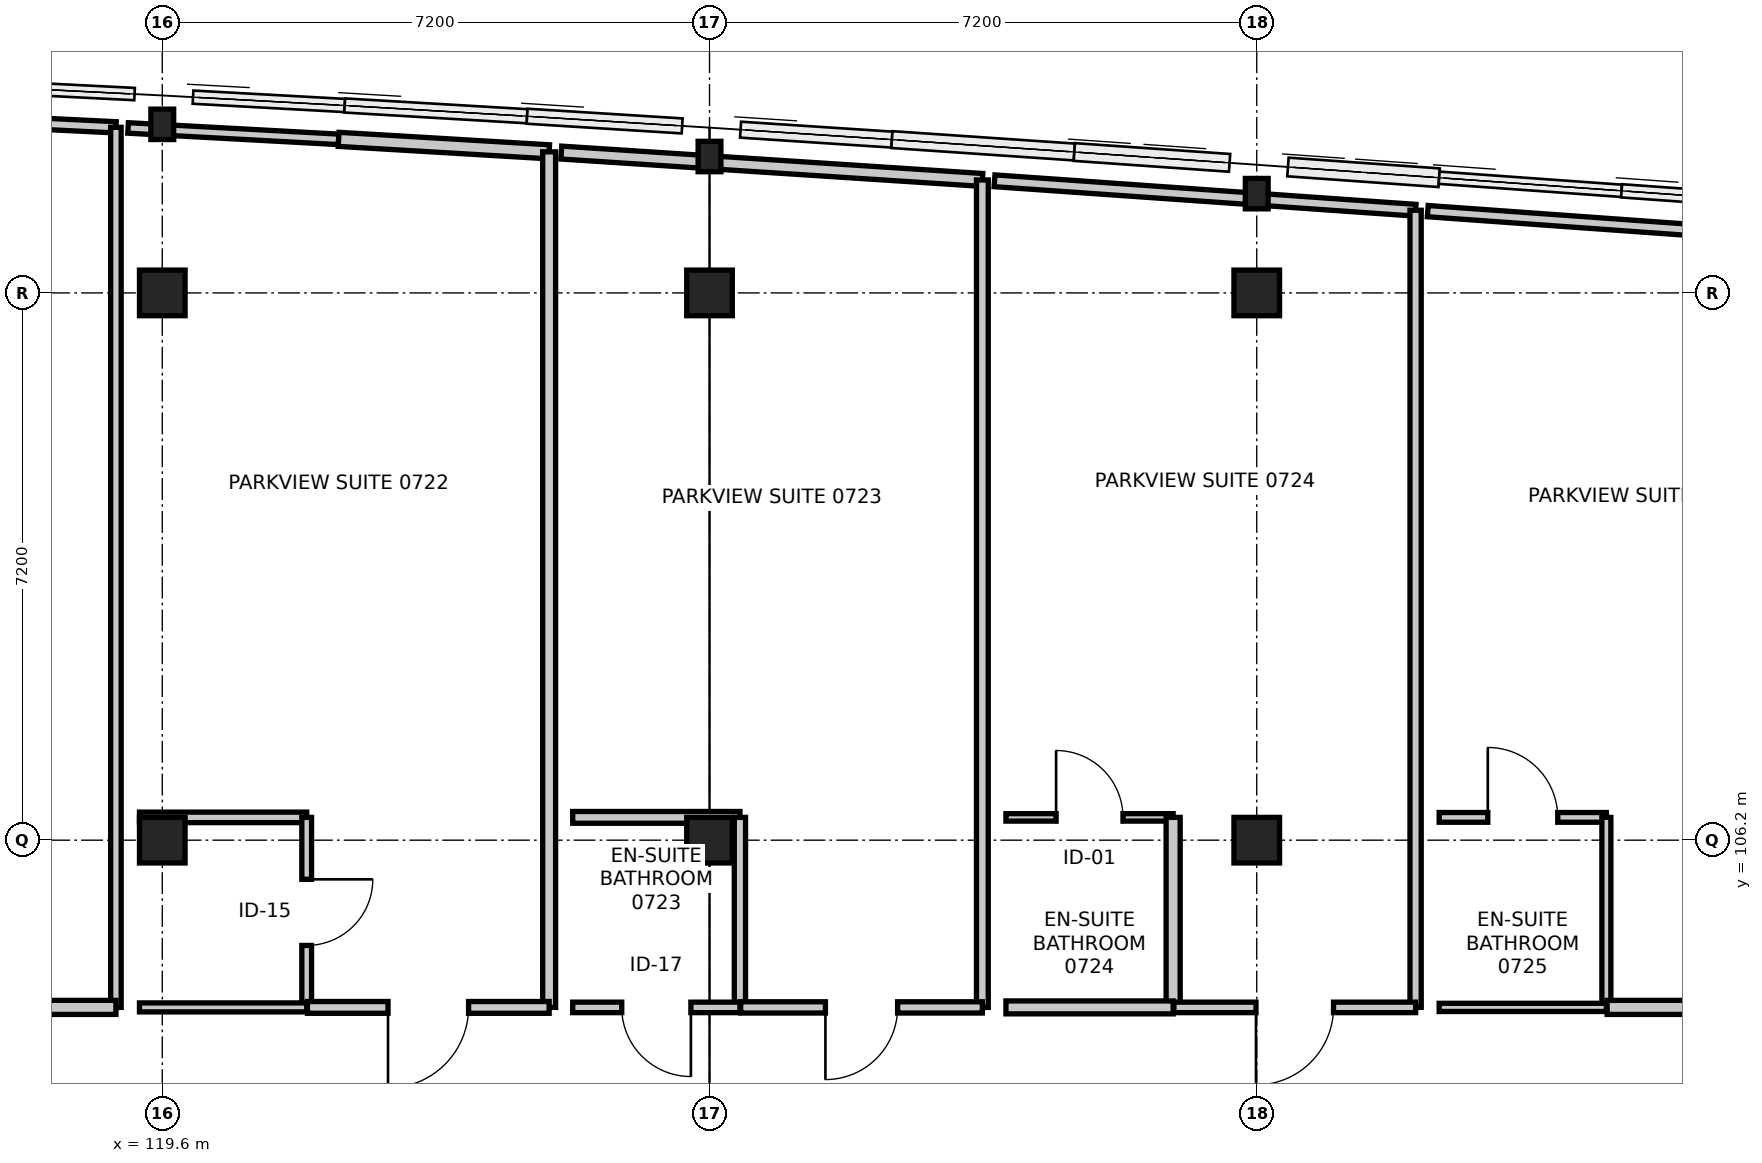
"""IFC4 building model, lengths in metres.
Left out: names, types, materials, properties, quantities, classifications, styles, units other than length and angle.
Written with IfcOpenShell. Run it as: python <this file> out.ifc"""

import sys

from ifc_helpers import new_model, si_unit, direction, frame, frame_2d, origin, origin_2d, place, context, subcontext, project, spatial, rectangle, i_section, extrude, element, fill, save


model = new_model("IFC4")
c1 = context("Model", 3, precision=1e-05, world=origin(), true_north=direction((0.0, 1.0)))
c2 = subcontext(c1, "Body", "Model", "MODEL_VIEW")
j1 = project(units=[si_unit("LENGTHUNIT", "METRE"), si_unit("PLANEANGLEUNIT", "RADIAN")], contexts=[c1])
p1 = place(None, origin())
s1 = spatial("IfcSite", under=j1, at=p1, CompositionType="ELEMENT")
p2 = place(p1, origin())
s2 = spatial("IfcBuilding", under=s1, at=p2, CompositionType="ELEMENT")
p3 = place(p2, frame((0.0, 0.0, 30.0)))
s3 = spatial("IfcBuildingStorey", under=s2, at=p3, CompositionType="ELEMENT", Elevation=30.0)
for number, where, z_axis, x_axis in (
    (1, (119.6, 106.2, 0.0), (0.0, 0.0, 1.0), (1.0, 0.0, 0.0)),
    (2, (119.6, 113.4, 0.0), (0.0, 0.0, 1.0), (1.0, 0.0, 0.0)),
):
    element("IfcColumn", number, at=place(p3, frame(where, z_axis=z_axis, x_axis=x_axis)), inside=s3, PredefinedType="COLUMN", context=c2, shape_type="SweptSolid", body=[
        extrude(rectangle(XDim=0.6, YDim=0.6, at=origin_2d()), origin(), (0.0, 0.0, 1.0), 3.6),
    ])
p4 = place(p3, frame((119.6, 115.618, 0.0), z_axis=(0.0, 0.0, 1.0), x_axis=(1.0, 0.0, 0.0)))
e3 = element("IfcColumn", 3, at=p4, inside=s3, PredefinedType="COLUMN", context=c2, shape_type="SweptSolid", body=[
    extrude(i_section(OverallWidth=0.3, OverallDepth=0.4, WebThickness=0.013, FlangeThickness=0.024, FilletRadius=0.027, at=origin_2d()), origin(), (0.0, 0.0, 1.0), 3.6),
])
for number, where, z_axis, x_axis in (
    (4, (126.8, 106.2, 0.0), (0.0, 0.0, 1.0), (1.0, 0.0, 0.0)),
    (5, (126.8, 113.4, 0.0), (0.0, 0.0, 1.0), (1.0, 0.0, 0.0)),
):
    element("IfcColumn", number, at=place(p3, frame(where, z_axis=z_axis, x_axis=x_axis)), inside=s3, PredefinedType="COLUMN", context=c2, shape_type="SweptSolid", body=[
        extrude(rectangle(XDim=0.6, YDim=0.6, at=origin_2d()), origin(), (0.0, 0.0, 1.0), 3.6),
    ])
p5 = place(p3, frame((126.8, 115.194, 0.0), z_axis=(0.0, 0.0, 1.0), x_axis=(1.0, 0.0, 0.0)))
e6 = element("IfcColumn", 6, at=p5, inside=s3, PredefinedType="COLUMN", context=c2, shape_type="SweptSolid", body=[
    extrude(i_section(OverallWidth=0.3, OverallDepth=0.4, WebThickness=0.013, FlangeThickness=0.024, FilletRadius=0.027, at=origin_2d()), origin(), (0.0, 0.0, 1.0), 3.6),
])
for number, where, z_axis, x_axis in (
    (7, (134.0, 106.2, 0.0), (0.0, 0.0, 1.0), (1.0, 0.0, 0.0)),
    (8, (134.0, 113.4, 0.0), (0.0, 0.0, 1.0), (1.0, 0.0, 0.0)),
):
    element("IfcColumn", number, at=place(p3, frame(where, z_axis=z_axis, x_axis=x_axis)), inside=s3, PredefinedType="COLUMN", context=c2, shape_type="SweptSolid", body=[
        extrude(rectangle(XDim=0.6, YDim=0.6, at=origin_2d()), origin(), (0.0, 0.0, 1.0), 3.6),
    ])
p6 = place(p3, frame((134.0, 114.706, 0.0), z_axis=(0.0, 0.0, 1.0), x_axis=(1.0, 0.0, 0.0)))
e9 = element("IfcColumn", 9, at=p6, inside=s3, PredefinedType="COLUMN", context=c2, shape_type="SweptSolid", body=[
    extrude(i_section(OverallWidth=0.3, OverallDepth=0.4, WebThickness=0.013, FlangeThickness=0.024, FilletRadius=0.027, at=origin_2d()), origin(), (0.0, 0.0, 1.0), 3.6),
])
p7 = place(p3, frame((116.22, 115.713, 0.0), z_axis=(0.0, 0.0, 1.0), x_axis=(0.998818612245, -0.048594030844, 0.0)))
e10 = element("IfcWall", 10, at=p7, inside=s3, PredefinedType="PARTITIONING", context=c2, shape_type="SweptSolid", body=[
    extrude(rectangle(XDim=2.773, YDim=0.148, at=frame_2d((1.387, 0.0))), origin(), (0.0, 0.0, 1.0), 2.936),
])
p8 = place(p3, frame((118.99, 115.578, 0.0), z_axis=(0.0, 0.0, 1.0), x_axis=(0.0, -1.0, 0.0)))
e11 = element("IfcWall", 11, at=p8, inside=s3, PredefinedType="PARTITIONING", context=c2, shape_type="SweptSolid", body=[
    extrude(rectangle(XDim=11.578, YDim=0.138, at=frame_2d((5.789, 0.0))), origin(), (0.0, 0.0, 1.0), 2.745),
])
p9 = place(p3, frame((118.99, 104.0, 0.0), z_axis=(0.0, 0.0, 1.0), x_axis=(-1.0, 0.0, 0.0)))
e12 = element("IfcWall", 12, at=p9, inside=s3, PredefinedType="PARTITIONING", context=c2, shape_type="SweptSolid", body=[
    extrude(rectangle(XDim=3.18, YDim=0.185, at=frame_2d((1.59, 0.0))), origin(), (0.0, 0.0, 1.0), 3.36),
])
p10 = place(p9, frame((1.1, 0.0, 0.0)))
e13 = element("IfcOpeningElement", 13, at=p10, cuts=e12, PredefinedType="OPENING", context=c2, shape_type="SweptSolid", body=[
    extrude(rectangle(XDim=0.98, YDim=2.15, at=frame_2d((0.49, 1.075))), frame((0.0, 0.103, 0.0), z_axis=(0.0, -1.0, 0.0), x_axis=(1.0, 0.0, 0.0)), (0.0, 0.0, 1.0), 0.205),
])
p11 = place(p3, frame((119.3, 106.5, 0.0), z_axis=(0.0, 0.0, 1.0), x_axis=(1.0, 0.0, 0.0)))
e14 = element("IfcWall", 14, at=p11, inside=s3, PredefinedType="PARTITIONING", context=c2, shape_type="SweptSolid", body=[
    extrude(rectangle(XDim=2.2, YDim=0.138, at=frame_2d((1.1, 0.0))), origin(), (0.0, 0.0, 1.0), 2.695),
])
p12 = place(p3, frame((121.5, 106.5, 0.0), z_axis=(0.0, 0.0, 1.0), x_axis=(0.0, -1.0, 0.0)))
e15 = element("IfcWall", 15, at=p12, inside=s3, PredefinedType="PARTITIONING", context=c2, shape_type="SweptSolid", body=[
    extrude(rectangle(XDim=2.5, YDim=0.128, at=frame_2d((1.25, 0.0))), origin(), (0.0, 0.0, 1.0), 2.745),
])
p13 = place(p12, frame((0.815, 0.0, 0.0)))
e16 = element("IfcOpeningElement", 16, at=p13, cuts=e15, PredefinedType="OPENING", context=c2, shape_type="SweptSolid", body=[
    extrude(rectangle(XDim=0.87, YDim=2.07, at=frame_2d((0.435, 1.035))), frame((0.0, 0.074, 0.0), z_axis=(0.0, -1.0, 0.0), x_axis=(1.0, 0.0, 0.0)), (0.0, 0.0, 1.0), 0.148),
])
p14 = place(p3, frame((121.5, 104.0, 0.0), z_axis=(0.0, 0.0, 1.0), x_axis=(-1.0, 0.0, 0.0)))
e17 = element("IfcWall", 17, at=p14, inside=s3, PredefinedType="PARTITIONING", context=c2, shape_type="SweptSolid", body=[
    extrude(rectangle(XDim=2.2, YDim=0.118, at=frame_2d((1.1, 0.0))), origin(), (0.0, 0.0, 1.0), 2.695),
])
p15 = place(p3, frame((119.15, 115.57, 0.0), z_axis=(0.0, 0.0, 1.0), x_axis=(0.998534185655, -0.054124671618, 0.0)))
e18 = element("IfcWall", 18, at=p15, inside=s3, PredefinedType="PARTITIONING", context=c2, shape_type="SweptSolid", body=[
    extrude(rectangle(XDim=2.774, YDim=0.138, at=frame_2d((1.387, 0.0))), origin(), (0.0, 0.0, 1.0), 2.936),
])
p16 = place(p3, frame((121.92, 115.42, 0.0), z_axis=(0.0, 0.0, 1.0), x_axis=(0.998250627829, -0.059124310056, 0.0)))
e19 = element("IfcWall", 19, at=p16, inside=s3, PredefinedType="PARTITIONING", context=c2, shape_type="SweptSolid", body=[
    extrude(rectangle(XDim=2.775, YDim=0.185, at=frame_2d((1.387, 0.0))), origin(), (0.0, 0.0, 1.0), 2.936),
])
p17 = place(p3, frame((124.69, 115.256, 0.0), z_axis=(0.0, 0.0, 1.0), x_axis=(0.0, -1.0, 0.0)))
e20 = element("IfcWall", 20, at=p17, inside=s3, PredefinedType="PARTITIONING", context=c2, shape_type="SweptSolid", body=[
    extrude(rectangle(XDim=11.256, YDim=0.17, at=frame_2d((5.628, 0.0))), origin(), (0.0, 0.0, 1.0), 2.745),
])
p18 = place(p3, frame((124.69, 104.0, 0.0), z_axis=(0.0, 0.0, 1.0), x_axis=(-1.0, 0.0, 0.0)))
e21 = element("IfcWall", 21, at=p18, inside=s3, PredefinedType="PARTITIONING", context=c2, shape_type="SweptSolid", body=[
    extrude(rectangle(XDim=3.18, YDim=0.155, at=frame_2d((1.59, 0.0))), origin(), (0.0, 0.0, 1.0), 3.36),
])
p19 = place(p18, frame((1.06, 0.0, 0.0)))
e22 = element("IfcOpeningElement", 22, at=p19, cuts=e21, PredefinedType="OPENING", context=c2, shape_type="SweptSolid", body=[
    extrude(rectangle(XDim=1.06, YDim=2.2, at=frame_2d((0.53, 1.1))), frame((0.0, 0.087, 0.0), z_axis=(0.0, -1.0, 0.0), x_axis=(1.0, 0.0, 0.0)), (0.0, 0.0, 1.0), 0.175),
])
p20 = place(p3, frame((125.0, 106.5, 0.0), z_axis=(0.0, 0.0, 1.0), x_axis=(1.0, 0.0, 0.0)))
e23 = element("IfcWall", 23, at=p20, inside=s3, PredefinedType="PARTITIONING", context=c2, shape_type="SweptSolid", body=[
    extrude(rectangle(XDim=2.2, YDim=0.155, at=frame_2d((1.1, 0.0))), origin(), (0.0, 0.0, 1.0), 2.695),
])
p21 = place(p3, frame((127.2, 106.5, 0.0), z_axis=(0.0, 0.0, 1.0), x_axis=(0.0, -1.0, 0.0)))
e24 = element("IfcWall", 24, at=p21, inside=s3, PredefinedType="PARTITIONING", context=c2, shape_type="SweptSolid", body=[
    extrude(rectangle(XDim=2.5, YDim=0.148, at=frame_2d((1.25, 0.0))), origin(), (0.0, 0.0, 1.0), 2.745),
])
p22 = place(p3, frame((127.2, 104.0, 0.0), z_axis=(0.0, 0.0, 1.0), x_axis=(-1.0, 0.0, 0.0)))
e25 = element("IfcWall", 25, at=p22, inside=s3, PredefinedType="PARTITIONING", context=c2, shape_type="SweptSolid", body=[
    extrude(rectangle(XDim=2.2, YDim=0.138, at=frame_2d((1.1, 0.0))), origin(), (0.0, 0.0, 1.0), 2.695),
])
p23 = place(p22, frame((0.645, 0.0, 0.0)))
e26 = element("IfcOpeningElement", 26, at=p23, cuts=e25, PredefinedType="OPENING", context=c2, shape_type="SweptSolid", body=[
    extrude(rectangle(XDim=0.91, YDim=2.11, at=frame_2d((0.455, 1.055))), frame((0.0, 0.079, 0.0), z_axis=(0.0, -1.0, 0.0), x_axis=(1.0, 0.0, 0.0)), (0.0, 0.0, 1.0), 0.158),
])
p24 = place(p3, frame((124.85, 115.246, 0.0), z_axis=(0.0, 0.0, 1.0), x_axis=(0.997893928542, -0.064866843445, 0.0)))
e27 = element("IfcWall", 27, at=p24, inside=s3, PredefinedType="PARTITIONING", context=c2, shape_type="SweptSolid", body=[
    extrude(rectangle(XDim=5.552, YDim=0.17, at=frame_2d((2.776, 0.0))), origin(), (0.0, 0.0, 1.0), 2.936),
])
p25 = place(p3, frame((130.39, 114.886, 0.0), z_axis=(0.0, 0.0, 1.0), x_axis=(0.0, -1.0, 0.0)))
e28 = element("IfcWall", 28, at=p25, inside=s3, PredefinedType="PARTITIONING", context=c2, shape_type="SweptSolid", body=[
    extrude(rectangle(XDim=10.886, YDim=0.155, at=frame_2d((5.443, 0.0))), origin(), (0.0, 0.0, 1.0), 2.745),
])
p26 = place(p3, frame((130.39, 104.0, 0.0), z_axis=(0.0, 0.0, 1.0), x_axis=(-1.0, 0.0, 0.0)))
e29 = element("IfcWall", 29, at=p26, inside=s3, PredefinedType="PARTITIONING", context=c2, shape_type="SweptSolid", body=[
    extrude(rectangle(XDim=3.18, YDim=0.148, at=frame_2d((1.59, 0.0))), origin(), (0.0, 0.0, 1.0), 3.36),
])
p27 = place(p26, frame((1.115, 0.0, 0.0)))
e30 = element("IfcOpeningElement", 30, at=p27, cuts=e29, PredefinedType="OPENING", context=c2, shape_type="SweptSolid", body=[
    extrude(rectangle(XDim=0.95, YDim=2.1, at=frame_2d((0.475, 1.05))), frame((0.0, 0.084, 0.0), z_axis=(0.0, -1.0, 0.0), x_axis=(1.0, 0.0, 0.0)), (0.0, 0.0, 1.0), 0.168),
])
p28 = place(p3, frame((130.7, 106.5, 0.0), z_axis=(0.0, 0.0, 1.0), x_axis=(1.0, 0.0, 0.0)))
e31 = element("IfcWall", 31, at=p28, inside=s3, PredefinedType="PARTITIONING", context=c2, shape_type="SweptSolid", body=[
    extrude(rectangle(XDim=2.2, YDim=0.098, at=frame_2d((1.1, 0.0))), origin(), (0.0, 0.0, 1.0), 3.36),
])
p29 = place(p28, frame((0.66, 0.0, 0.0)))
e32 = element("IfcOpeningElement", 32, at=p29, cuts=e31, PredefinedType="OPENING", context=c2, shape_type="SweptSolid", body=[
    extrude(rectangle(XDim=0.88, YDim=2.06, at=frame_2d((0.44, 1.03))), frame((0.0, 0.059, 0.0), z_axis=(0.0, -1.0, 0.0), x_axis=(1.0, 0.0, 0.0)), (0.0, 0.0, 1.0), 0.118),
])
p30 = place(p3, frame((132.9, 106.5, 0.0), z_axis=(0.0, 0.0, 1.0), x_axis=(0.0, -1.0, 0.0)))
e33 = element("IfcWall", 33, at=p30, inside=s3, PredefinedType="PARTITIONING", context=c2, shape_type="SweptSolid", body=[
    extrude(rectangle(XDim=2.5, YDim=0.185, at=frame_2d((1.25, 0.0))), origin(), (0.0, 0.0, 1.0), 2.745),
])
p31 = place(p3, frame((132.9, 104.0, 0.0), z_axis=(0.0, 0.0, 1.0), x_axis=(-1.0, 0.0, 0.0)))
e34 = element("IfcWall", 34, at=p31, inside=s3, PredefinedType="PARTITIONING", context=c2, shape_type="SweptSolid", body=[
    extrude(rectangle(XDim=2.2, YDim=0.17, at=frame_2d((1.1, 0.0))), origin(), (0.0, 0.0, 1.0), 3.36),
])
p32 = place(p3, frame((130.55, 114.875, 0.0), z_axis=(0.0, 0.0, 1.0), x_axis=(0.997557251982, -0.069853625657, 0.0)))
e35 = element("IfcWall", 35, at=p32, inside=s3, PredefinedType="PARTITIONING", context=c2, shape_type="SweptSolid", body=[
    extrude(rectangle(XDim=5.554, YDim=0.155, at=frame_2d((2.777, 0.0))), origin(), (0.0, 0.0, 1.0), 2.936),
])
p33 = place(p3, frame((136.09, 114.487, 0.0), z_axis=(0.0, 0.0, 1.0), x_axis=(0.0, -1.0, 0.0)))
e36 = element("IfcWall", 36, at=p33, inside=s3, PredefinedType="PARTITIONING", context=c2, shape_type="SweptSolid", body=[
    extrude(rectangle(XDim=10.487, YDim=0.148, at=frame_2d((5.244, 0.0))), origin(), (0.0, 0.0, 1.0), 2.745),
])
p34 = place(p3, frame((136.09, 104.0, 0.0), z_axis=(0.0, 0.0, 1.0), x_axis=(-1.0, 0.0, 0.0)))
e37 = element("IfcWall", 37, at=p34, inside=s3, PredefinedType="PARTITIONING", context=c2, shape_type="SweptSolid", body=[
    extrude(rectangle(XDim=3.18, YDim=0.138, at=frame_2d((1.59, 0.0))), origin(), (0.0, 0.0, 1.0), 2.695),
])
p35 = place(p34, frame((1.08, 0.0, 0.0)))
e38 = element("IfcOpeningElement", 38, at=p35, cuts=e37, PredefinedType="OPENING", context=c2, shape_type="SweptSolid", body=[
    extrude(rectangle(XDim=1.02, YDim=2.15, at=frame_2d((0.51, 1.075))), frame((0.0, 0.079, 0.0), z_axis=(0.0, -1.0, 0.0), x_axis=(1.0, 0.0, 0.0)), (0.0, 0.0, 1.0), 0.158),
])
p36 = place(p3, frame((136.4, 106.5, 0.0), z_axis=(0.0, 0.0, 1.0), x_axis=(1.0, 0.0, 0.0)))
e39 = element("IfcWall", 39, at=p36, inside=s3, PredefinedType="PARTITIONING", context=c2, shape_type="SweptSolid", body=[
    extrude(rectangle(XDim=2.2, YDim=0.128, at=frame_2d((1.1, 0.0))), origin(), (0.0, 0.0, 1.0), 3.36),
])
p37 = place(p36, frame((0.64, 0.0, 0.0)))
e40 = element("IfcOpeningElement", 40, at=p37, cuts=e39, PredefinedType="OPENING", context=c2, shape_type="SweptSolid", body=[
    extrude(rectangle(XDim=0.92, YDim=2.1, at=frame_2d((0.46, 1.05))), frame((0.0, 0.074, 0.0), z_axis=(0.0, -1.0, 0.0), x_axis=(1.0, 0.0, 0.0)), (0.0, 0.0, 1.0), 0.148),
])
p38 = place(p3, frame((138.6, 106.5, 0.0), z_axis=(0.0, 0.0, 1.0), x_axis=(0.0, -1.0, 0.0)))
e41 = element("IfcWall", 41, at=p38, inside=s3, PredefinedType="PARTITIONING", context=c2, shape_type="SweptSolid", body=[
    extrude(rectangle(XDim=2.5, YDim=0.118, at=frame_2d((1.25, 0.0))), origin(), (0.0, 0.0, 1.0), 2.745),
])
p39 = place(p3, frame((138.6, 104.0, 0.0), z_axis=(0.0, 0.0, 1.0), x_axis=(-1.0, 0.0, 0.0)))
e42 = element("IfcWall", 42, at=p39, inside=s3, PredefinedType="PARTITIONING", context=c2, shape_type="SweptSolid", body=[
    extrude(rectangle(XDim=2.2, YDim=0.108, at=frame_2d((1.1, 0.0))), origin(), (0.0, 0.0, 1.0), 3.36),
])
p40 = place(p3, frame((136.25, 114.476, 0.0), z_axis=(0.0, 0.0, 1.0), x_axis=(0.997452001605, -0.071340763203, 0.0)))
e43 = element("IfcWall", 43, at=p40, inside=s3, PredefinedType="PARTITIONING", context=c2, shape_type="SweptSolid", body=[
    extrude(rectangle(XDim=5.554, YDim=0.148, at=frame_2d((2.777, 0.0))), origin(), (0.0, 0.0, 1.0), 2.936),
])
p41 = place(p3, frame((141.79, 104.0, 0.0), z_axis=(0.0, 0.0, 1.0), x_axis=(-1.0, 0.0, 0.0)))
e44 = element("IfcWall", 44, at=p41, inside=s3, PredefinedType="PARTITIONING", context=c2, shape_type="SweptSolid", body=[
    extrude(rectangle(XDim=3.18, YDim=0.185, at=frame_2d((1.59, 0.0))), origin(), (0.0, 0.0, 1.0), 2.695),
])
p42 = place(p41, frame((1.03, 0.0, 0.0)))
e45 = element("IfcOpeningElement", 45, at=p42, cuts=e44, PredefinedType="OPENING", context=c2, shape_type="SweptSolid", body=[
    extrude(rectangle(XDim=1.12, YDim=2.2, at=frame_2d((0.56, 1.1))), frame((0.0, 0.103, 0.0), z_axis=(0.0, -1.0, 0.0), x_axis=(1.0, 0.0, 0.0)), (0.0, 0.0, 1.0), 0.205),
])
p43 = place(p13, origin())
e46 = element("IfcDoor", 46, at=p43, inside=s3, OperationType="SINGLE_SWING_LEFT", PredefinedType="DOOR", context=c2, shape_type="SweptSolid", body=[
    extrude(rectangle(XDim=0.87, YDim=2.07, at=frame_2d((0.435, 1.035))), frame((0.0, 0.025, 0.0), z_axis=(0.0, -1.0, 0.0), x_axis=(1.0, 0.0, 0.0)), (0.0, 0.0, 1.0), 0.05),
])
fill(e16, e46)
p44 = place(p19, origin())
e47 = element("IfcDoor", 47, at=p44, inside=s3, OperationType="SINGLE_SWING_RIGHT", PredefinedType="DOOR", context=c2, shape_type="SweptSolid", body=[
    extrude(rectangle(XDim=1.06, YDim=2.2, at=frame_2d((0.53, 1.1))), frame((0.0, 0.025, 0.0), z_axis=(0.0, -1.0, 0.0), x_axis=(1.0, 0.0, 0.0)), (0.0, 0.0, 1.0), 0.05),
])
fill(e22, e47)
p45 = place(p23, origin())
e48 = element("IfcDoor", 48, at=p45, inside=s3, OperationType="SINGLE_SWING_LEFT", PredefinedType="DOOR", context=c2, shape_type="SweptSolid", body=[
    extrude(rectangle(XDim=0.91, YDim=2.11, at=frame_2d((0.455, 1.055))), frame((0.0, 0.025, 0.0), z_axis=(0.0, -1.0, 0.0), x_axis=(1.0, 0.0, 0.0)), (0.0, 0.0, 1.0), 0.05),
])
fill(e26, e48)
p46 = place(p27, origin())
e49 = element("IfcDoor", 49, at=p46, inside=s3, OperationType="SINGLE_SWING_RIGHT", PredefinedType="DOOR", context=c2, shape_type="SweptSolid", body=[
    extrude(rectangle(XDim=0.95, YDim=2.1, at=frame_2d((0.475, 1.05))), frame((0.0, 0.025, 0.0), z_axis=(0.0, -1.0, 0.0), x_axis=(1.0, 0.0, 0.0)), (0.0, 0.0, 1.0), 0.05),
])
fill(e30, e49)
p47 = place(p29, origin())
e50 = element("IfcDoor", 50, at=p47, inside=s3, OperationType="SINGLE_SWING_LEFT", PredefinedType="DOOR", context=c2, shape_type="SweptSolid", body=[
    extrude(rectangle(XDim=0.88, YDim=2.06, at=frame_2d((0.44, 1.03))), frame((0.0, 0.025, 0.0), z_axis=(0.0, -1.0, 0.0), x_axis=(1.0, 0.0, 0.0)), (0.0, 0.0, 1.0), 0.05),
])
fill(e32, e50)
p48 = place(p35, origin())
e51 = element("IfcDoor", 51, at=p48, inside=s3, OperationType="SINGLE_SWING_RIGHT", PredefinedType="DOOR", context=c2, shape_type="SweptSolid", body=[
    extrude(rectangle(XDim=1.02, YDim=2.15, at=frame_2d((0.51, 1.075))), frame((0.0, 0.025, 0.0), z_axis=(0.0, -1.0, 0.0), x_axis=(1.0, 0.0, 0.0)), (0.0, 0.0, 1.0), 0.05),
])
fill(e38, e51)
p49 = place(p37, origin())
e52 = element("IfcDoor", 52, at=p49, inside=s3, OperationType="SINGLE_SWING_LEFT", PredefinedType="DOOR", context=c2, shape_type="SweptSolid", body=[
    extrude(rectangle(XDim=0.92, YDim=2.1, at=frame_2d((0.46, 1.05))), frame((0.0, 0.025, 0.0), z_axis=(0.0, -1.0, 0.0), x_axis=(1.0, 0.0, 0.0)), (0.0, 0.0, 1.0), 0.05),
])
fill(e40, e52)
save(model, sys.argv[1])
